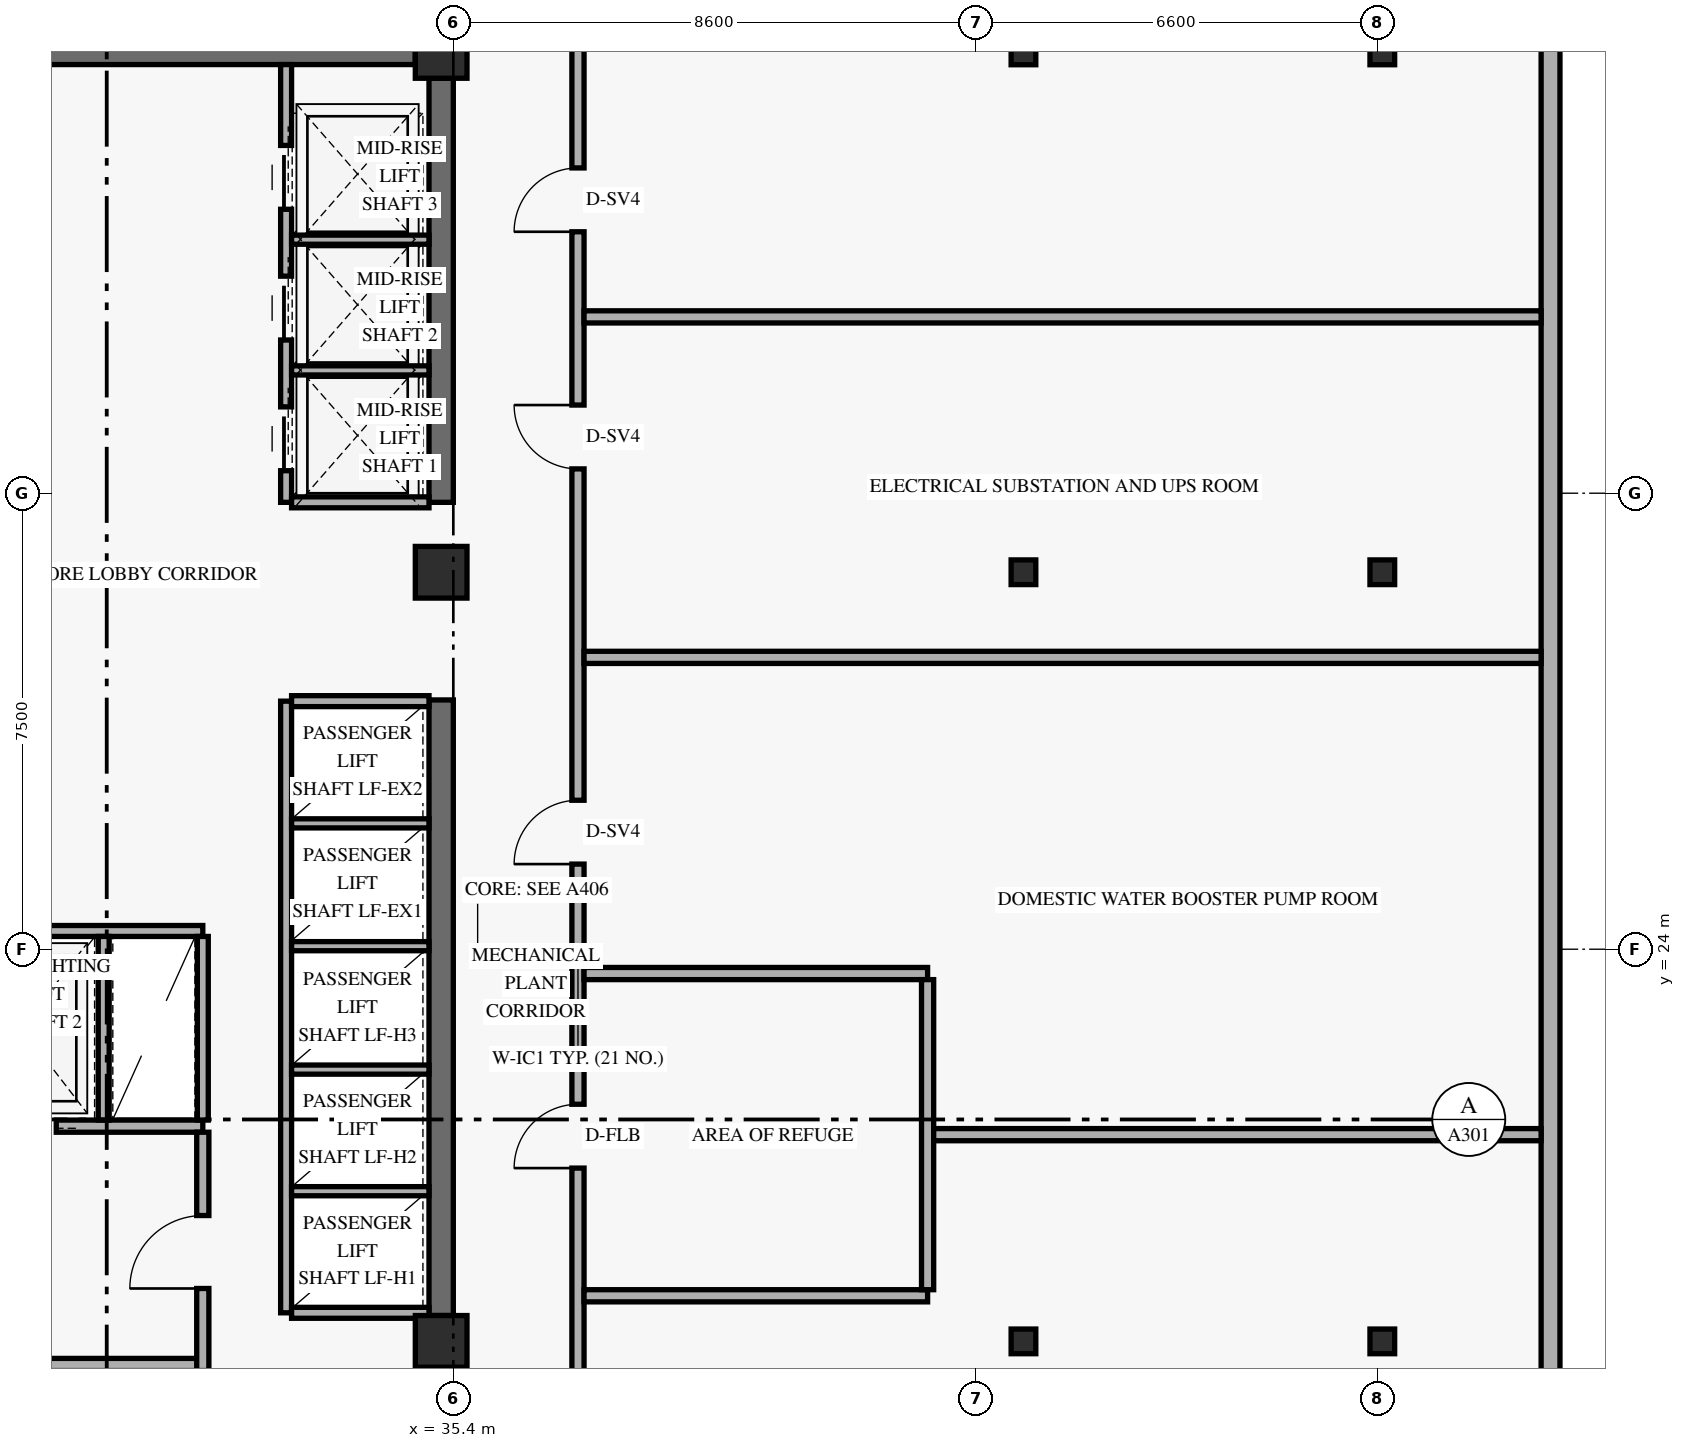
"""IFC4 building model, lengths in metres.
Left out: names, types, materials, properties, quantities, classifications, styles, units other than length and angle.
Written with IfcOpenShell. Run it as: python <this file> out.ifc"""

import sys

from ifc_helpers import new_model, si_unit, direction, frame, frame_2d, origin, origin_2d, place, context, subcontext, project, spatial, rectangle, hollow_rectangle, extrude, element, fill, save


model = new_model("IFC4")
c1 = context("Model", 3, precision=1e-05, world=origin(), true_north=direction((0.0, 1.0)))
c2 = subcontext(c1, "Body", "Model", "MODEL_VIEW")
j1 = project(units=[si_unit("LENGTHUNIT", "METRE"), si_unit("PLANEANGLEUNIT", "RADIAN")], contexts=[c1])
p1 = place(None, origin())
s1 = spatial("IfcSite", under=j1, at=p1, CompositionType="ELEMENT")
p2 = place(p1, origin())
s2 = spatial("IfcBuilding", under=s1, at=p2, CompositionType="ELEMENT")
p3 = place(p2, frame((0.0, 0.0, 135.6)))
s3 = spatial("IfcBuildingStorey", under=s2, at=p3, CompositionType="ELEMENT", Elevation=135.6)
p4 = place(p3, frame((35.2, 17.975, 0.0), z_axis=(0.0, 0.0, 1.0), x_axis=(0.0, 1.0, 0.0)))
e1 = element("IfcWall", 1, at=p4, inside=s3, PredefinedType="SHEAR", context=c2, shape_type="SweptSolid", body=[
    extrude(rectangle(XDim=10.125, YDim=0.4, at=frame_2d((5.062, 0.0))), origin(), (0.0, 0.0, 1.0), 4.549),
])
p5 = place(p3, frame((35.2, 31.35, 0.0), z_axis=(0.0, 0.0, 1.0), x_axis=(0.0, 1.0, 0.0)))
e2 = element("IfcWall", 2, at=p5, inside=s3, PredefinedType="SHEAR", context=c2, shape_type="SweptSolid", body=[
    extrude(rectangle(XDim=6.975, YDim=0.4, at=frame_2d((3.487, 0.0))), origin(), (0.0, 0.0, 1.0), 4.549),
])
p6 = place(p3, frame((24.625, 38.75, 0.0), z_axis=(0.0, 0.0, 1.0), x_axis=(1.0, 0.0, 0.0)))
e3 = element("IfcWall", 3, at=p6, inside=s3, PredefinedType="SHEAR", context=c2, shape_type="SweptSolid", body=[
    extrude(rectangle(XDim=10.15, YDim=0.4, at=frame_2d((5.075, 0.0))), origin(), (0.0, 0.0, 1.0), 5.16),
])
for number, where, z_axis, x_axis in (
    (4, (35.2, 17.55, 0.0), (0.0, 0.0, 1.0), (1.0, 0.0, 0.0)),
    (5, (35.2, 30.2, 0.0), (0.0, 0.0, 1.0), (1.0, 0.0, 0.0)),
    (6, (35.2, 38.75, 0.0), (0.0, 0.0, 1.0), (1.0, 0.0, 0.0)),
):
    element("IfcColumn", number, at=place(p3, frame(where, z_axis=z_axis, x_axis=x_axis)), inside=s3, PredefinedType="COLUMN", context=c2, shape_type="SweptSolid", body=[
        extrude(rectangle(XDim=0.85, YDim=0.85, at=origin_2d()), origin(), (0.0, 0.0, 1.0), 5.4),
    ])
for number, where, z_axis, x_axis in (
    (7, (44.682, 17.55, 0.0), (0.035, 0.0, 0.999), (0.0, 1.0, 0.0)),
    (8, (44.682, 30.2, 0.0), (0.035, 0.0, 0.999), (0.0, 1.0, 0.0)),
    (9, (44.682, 38.75, 0.0), (0.035, 0.0, 0.999), (0.0, 1.0, 0.0)),
):
    element("IfcColumn", number, at=place(p3, frame(where, z_axis=z_axis, x_axis=x_axis)), inside=s3, PredefinedType="COLUMN", context=c2, shape_type="SweptSolid", body=[
        extrude(hollow_rectangle(XDim=0.406, YDim=0.406, WallThickness=0.016, at=origin_2d()), origin(), (0.0, 0.0, 1.0), 5.403),
    ])
for number, where, z_axis, x_axis in (
    (10, (50.521, 17.55, 0.0), (0.058, 0.0, 0.998), (0.0, 1.0, 0.0)),
    (11, (50.521, 30.2, 0.0), (0.058, 0.0, 0.998), (0.0, 1.0, 0.0)),
    (12, (50.521, 38.75, 0.0), (0.058, 0.0, 0.998), (0.0, 1.0, 0.0)),
):
    element("IfcColumn", number, at=place(p3, frame(where, z_axis=z_axis, x_axis=x_axis)), inside=s3, PredefinedType="COLUMN", context=c2, shape_type="SweptSolid", body=[
        extrude(hollow_rectangle(XDim=0.406, YDim=0.406, WallThickness=0.016, at=origin_2d()), origin(), (0.0, 0.0, 1.0), 5.409),
    ])
p7 = place(p3, frame((53.445, 6.32, 0.0), z_axis=(0.0, 0.0, 1.0), x_axis=(0.0, 1.0, 0.0)))
e13 = element("IfcWall", 13, at=p7, inside=s3, PredefinedType="SOLIDWALL", context=c2, shape_type="SweptSolid", body=[
    extrude(rectangle(XDim=35.36, YDim=0.31, at=frame_2d((17.68, 0.0))), origin(), (0.0, 0.0, 1.0), 5.16),
])
p8 = place(p3, frame((24.45, 21.09, 0.0), z_axis=(0.0, 0.0, 1.0), x_axis=(1.0, 0.0, 0.0)))
e14 = element("IfcWall", 14, at=p8, inside=s3, PredefinedType="STANDARD", context=c2, shape_type="SweptSolid", body=[
    extrude(rectangle(XDim=6.83, YDim=0.2, at=frame_2d((3.415, 0.0))), origin(), (0.0, 0.0, 1.0), 5.16),
])
p9 = place(p8, frame((0.72, 0.0, 0.0)))
e15 = element("IfcOpeningElement", 15, at=p9, cuts=e14, PredefinedType="OPENING", context=c2, shape_type="SweptSolid", body=[
    extrude(rectangle(XDim=1.1, YDim=2.2, at=frame_2d((0.55, 1.1))), frame((0.0, 0.11, 0.0), z_axis=(0.0, -1.0, 0.0), x_axis=(1.0, 0.0, 0.0)), (0.0, 0.0, 1.0), 0.22),
])
p10 = place(p8, frame((3.32, 0.0, 0.0)))
e16 = element("IfcOpeningElement", 16, at=p10, cuts=e14, PredefinedType="OPENING", context=c2, shape_type="SweptSolid", body=[
    extrude(rectangle(XDim=1.1, YDim=2.2, at=frame_2d((0.55, 1.1))), frame((0.0, 0.11, 0.0), z_axis=(0.0, -1.0, 0.0), x_axis=(1.0, 0.0, 0.0)), (0.0, 0.0, 1.0), 0.22),
])
p11 = place(p3, frame((28.38, 17.17, 0.0), z_axis=(0.0, 0.0, 1.0), x_axis=(1.0, 0.0, 0.0)))
e17 = element("IfcWall", 17, at=p11, inside=s3, PredefinedType="STANDARD", context=c2, shape_type="SweptSolid", body=[
    extrude(rectangle(XDim=2.9, YDim=0.2, at=frame_2d((1.45, 0.0))), origin(), (0.0, 0.0, 1.0), 5.16),
])
p12 = place(p3, frame((31.28, 17.07, 0.0), z_axis=(0.0, 0.0, 1.0), x_axis=(0.0, 1.0, 0.0)))
e18 = element("IfcWall", 18, at=p12, inside=s3, PredefinedType="STANDARD", context=c2, shape_type="SweptSolid", body=[
    extrude(rectangle(XDim=3.92, YDim=0.2, at=frame_2d((1.96, 0.0))), origin(), (0.0, 0.0, 1.0), 4.531),
])
p13 = place(p12, frame((1.35, 0.0, 0.0)))
e19 = element("IfcOpeningElement", 19, at=p13, cuts=e18, PredefinedType="OPENING", context=c2, shape_type="SweptSolid", body=[
    extrude(rectangle(XDim=1.2, YDim=2.15, at=frame_2d((0.6, 1.075))), frame((0.0, 0.11, 0.0), z_axis=(0.0, -1.0, 0.0), x_axis=(1.0, 0.0, 0.0)), (0.0, 0.0, 1.0), 0.22),
])
p14 = place(p3, frame((24.45, 24.3, 0.0), z_axis=(0.0, 0.0, 1.0), x_axis=(1.0, 0.0, 0.0)))
e20 = element("IfcWall", 20, at=p14, inside=s3, PredefinedType="STANDARD", context=c2, shape_type="SweptSolid", body=[
    extrude(rectangle(XDim=6.83, YDim=0.18, at=frame_2d((3.415, 0.0))), origin(), (0.0, 0.0, 1.0), 5.16),
])
for number, where, z_axis, x_axis in (
    (21, (29.65, 21.19, 0.0), (0.0, 0.0, 1.0), (0.0, 1.0, 0.0)),
    (22, (31.28, 21.19, 0.0), (0.0, 0.0, 1.0), (0.0, 1.0, 0.0)),
):
    element("IfcWall", number, at=place(p3, frame(where, z_axis=z_axis, x_axis=x_axis)), inside=s3, PredefinedType="STANDARD", context=c2, shape_type="SweptSolid", body=[
        extrude(rectangle(XDim=3.02, YDim=0.18, at=frame_2d((1.51, 0.0))), origin(), (0.0, 0.0, 1.0), 5.16),
    ])
p15 = place(p3, frame((32.65, 18.02, 0.0), z_axis=(0.0, 0.0, 1.0), x_axis=(0.0, 1.0, 0.0)))
e23 = element("IfcWall", 23, at=p15, inside=s3, PredefinedType="STANDARD", context=c2, shape_type="SweptSolid", body=[
    extrude(rectangle(XDim=10.06, YDim=0.18, at=frame_2d((5.03, 0.0))), origin(), (0.0, 0.0, 1.0), 5.16),
])
for number, where, z_axis, x_axis in (
    (24, (32.74, 18.02, 0.0), (0.0, 0.0, 1.0), (1.0, 0.0, 0.0)),
    (25, (32.74, 28.08, 0.0), (0.0, 0.0, 1.0), (1.0, 0.0, 0.0)),
):
    element("IfcWall", number, at=place(p3, frame(where, z_axis=z_axis, x_axis=x_axis)), inside=s3, PredefinedType="STANDARD", context=c2, shape_type="SweptSolid", body=[
        extrude(rectangle(XDim=2.26, YDim=0.18, at=frame_2d((1.13, 0.0))), origin(), (0.0, 0.0, 1.0), 5.16),
    ])
for number, where, z_axis, x_axis in (
    (26, (32.74, 20.02, 0.0), (0.0, 0.0, 1.0), (1.0, 0.0, 0.0)),
    (27, (32.74, 22.02, 0.0), (0.0, 0.0, 1.0), (1.0, 0.0, 0.0)),
    (28, (32.74, 24.05, 0.0), (0.0, 0.0, 1.0), (1.0, 0.0, 0.0)),
    (29, (32.74, 26.07, 0.0), (0.0, 0.0, 1.0), (1.0, 0.0, 0.0)),
):
    element("IfcWall", number, at=place(p3, frame(where, z_axis=z_axis, x_axis=x_axis)), inside=s3, PredefinedType="STANDARD", context=c2, shape_type="SweptSolid", body=[
        extrude(rectangle(XDim=2.26, YDim=0.15, at=frame_2d((1.13, 0.0))), origin(), (0.0, 0.0, 1.0), 5.16),
    ])
p16 = place(p3, frame((32.65, 31.35, 0.0), z_axis=(0.0, 0.0, 1.0), x_axis=(0.0, 1.0, 0.0)))
e30 = element("IfcWall", 30, at=p16, inside=s3, PredefinedType="STANDARD", context=c2, shape_type="SweptSolid", body=[
    extrude(rectangle(XDim=7.2, YDim=0.18, at=frame_2d((3.6, 0.0))), origin(), (0.0, 0.0, 1.0), 5.16),
])
p17 = place(p16, frame((0.52, 0.0, 0.0)))
e31 = element("IfcOpeningElement", 31, at=p17, cuts=e30, PredefinedType="OPENING", context=c2, shape_type="SweptSolid", body=[
    extrude(rectangle(XDim=1.05, YDim=2.2, at=frame_2d((0.525, 1.1))), frame((0.0, 0.1, 0.0), z_axis=(0.0, -1.0, 0.0), x_axis=(1.0, 0.0, 0.0)), (0.0, 0.0, 1.0), 0.2),
])
p18 = place(p16, frame((2.67, 0.0, 0.0)))
e32 = element("IfcOpeningElement", 32, at=p18, cuts=e30, PredefinedType="OPENING", context=c2, shape_type="SweptSolid", body=[
    extrude(rectangle(XDim=1.05, YDim=2.2, at=frame_2d((0.525, 1.1))), frame((0.0, 0.1, 0.0), z_axis=(0.0, -1.0, 0.0), x_axis=(1.0, 0.0, 0.0)), (0.0, 0.0, 1.0), 0.2),
])
p19 = place(p16, frame((4.82, 0.0, 0.0)))
e33 = element("IfcOpeningElement", 33, at=p19, cuts=e30, PredefinedType="OPENING", context=c2, shape_type="SweptSolid", body=[
    extrude(rectangle(XDim=1.05, YDim=2.2, at=frame_2d((0.525, 1.1))), frame((0.0, 0.1, 0.0), z_axis=(0.0, -1.0, 0.0), x_axis=(1.0, 0.0, 0.0)), (0.0, 0.0, 1.0), 0.2),
])
p20 = place(p3, frame((32.74, 31.35, 0.0), z_axis=(0.0, 0.0, 1.0), x_axis=(1.0, 0.0, 0.0)))
e34 = element("IfcWall", 34, at=p20, inside=s3, PredefinedType="STANDARD", context=c2, shape_type="SweptSolid", body=[
    extrude(rectangle(XDim=2.26, YDim=0.18, at=frame_2d((1.13, 0.0))), origin(), (0.0, 0.0, 1.0), 5.16),
])
for number, where, z_axis, x_axis in (
    (35, (32.74, 33.52, 0.0), (0.0, 0.0, 1.0), (1.0, 0.0, 0.0)),
    (36, (32.74, 35.67, 0.0), (0.0, 0.0, 1.0), (1.0, 0.0, 0.0)),
):
    element("IfcWall", number, at=place(p3, frame(where, z_axis=z_axis, x_axis=x_axis)), inside=s3, PredefinedType="STANDARD", context=c2, shape_type="SweptSolid", body=[
        extrude(rectangle(XDim=2.26, YDim=0.15, at=frame_2d((1.13, 0.0))), origin(), (0.0, 0.0, 1.0), 5.16),
    ])
p21 = place(p3, frame((37.45, 8.65, 0.0), z_axis=(0.0, 0.0, 1.0), x_axis=(0.0, 1.0, 0.0)))
e37 = element("IfcWall", 37, at=p21, inside=s3, PredefinedType="STANDARD", context=c2, shape_type="SweptSolid", body=[
    extrude(rectangle(XDim=30.7, YDim=0.2, at=frame_2d((15.35, 0.0))), origin(), (0.0, 0.0, 1.0), 4.531),
])
p22 = place(p21, frame((11.75, 0.0, 0.0)))
e38 = element("IfcOpeningElement", 38, at=p22, cuts=e37, PredefinedType="OPENING", context=c2, shape_type="SweptSolid", body=[
    extrude(rectangle(XDim=1.05, YDim=2.15, at=frame_2d((0.525, 1.075))), frame((0.0, 0.11, 0.0), z_axis=(0.0, -1.0, 0.0), x_axis=(1.0, 0.0, 0.0)), (0.0, 0.0, 1.0), 0.22),
])
p23 = place(p21, frame((5.75, 0.0, 0.0)))
e39 = element("IfcOpeningElement", 39, at=p23, cuts=e37, PredefinedType="OPENING", context=c2, shape_type="SweptSolid", body=[
    extrude(rectangle(XDim=1.0, YDim=2.15, at=frame_2d((0.5, 1.075))), frame((0.0, 0.11, 0.0), z_axis=(0.0, -1.0, 0.0), x_axis=(1.0, 0.0, 0.0)), (0.0, 0.0, 1.0), 0.22),
])
p24 = place(p21, frame((16.75, 0.0, 0.0)))
e40 = element("IfcOpeningElement", 40, at=p24, cuts=e37, PredefinedType="OPENING", context=c2, shape_type="SweptSolid", body=[
    extrude(rectangle(XDim=1.05, YDim=2.15, at=frame_2d((0.525, 1.075))), frame((0.0, 0.11, 0.0), z_axis=(0.0, -1.0, 0.0), x_axis=(1.0, 0.0, 0.0)), (0.0, 0.0, 1.0), 0.22),
])
p25 = place(p21, frame((23.25, 0.0, 0.0)))
e41 = element("IfcOpeningElement", 41, at=p25, cuts=e37, PredefinedType="OPENING", context=c2, shape_type="SweptSolid", body=[
    extrude(rectangle(XDim=1.05, YDim=2.15, at=frame_2d((0.525, 1.075))), frame((0.0, 0.11, 0.0), z_axis=(0.0, -1.0, 0.0), x_axis=(1.0, 0.0, 0.0)), (0.0, 0.0, 1.0), 0.22),
])
p26 = place(p21, frame((27.15, 0.0, 0.0)))
e42 = element("IfcOpeningElement", 42, at=p26, cuts=e37, PredefinedType="OPENING", context=c2, shape_type="SweptSolid", body=[
    extrude(rectangle(XDim=1.05, YDim=2.15, at=frame_2d((0.525, 1.075))), frame((0.0, 0.11, 0.0), z_axis=(0.0, -1.0, 0.0), x_axis=(1.0, 0.0, 0.0)), (0.0, 0.0, 1.0), 0.22),
])
for number, where, z_axis, x_axis in (
    (43, (37.55, 18.3, 0.0), (0.0, 0.0, 1.0), (1.0, 0.0, 0.0)),
    (44, (37.55, 23.6, 0.0), (0.0, 0.0, 1.0), (1.0, 0.0, 0.0)),
):
    element("IfcWall", number, at=place(p3, frame(where, z_axis=z_axis, x_axis=x_axis)), inside=s3, PredefinedType="STANDARD", context=c2, shape_type="SweptSolid", body=[
        extrude(rectangle(XDim=5.65, YDim=0.2, at=frame_2d((2.825, 0.0))), origin(), (0.0, 0.0, 1.0), 5.16),
    ])
p27 = place(p3, frame((43.2, 18.4, 0.0), z_axis=(0.0, 0.0, 1.0), x_axis=(0.0, 1.0, 0.0)))
e45 = element("IfcWall", 45, at=p27, inside=s3, PredefinedType="STANDARD", context=c2, shape_type="SweptSolid", body=[
    extrude(rectangle(XDim=5.1, YDim=0.2, at=frame_2d((2.55, 0.0))), origin(), (0.0, 0.0, 1.0), 5.16),
])
p28 = place(p3, frame((43.3, 20.95, 0.0), z_axis=(0.0, 0.0, 1.0), x_axis=(1.0, 0.0, 0.0)))
e46 = element("IfcWall", 46, at=p28, inside=s3, PredefinedType="STANDARD", context=c2, shape_type="SweptSolid", body=[
    extrude(rectangle(XDim=9.99, YDim=0.2, at=frame_2d((4.995, 0.0))), origin(), (0.0, 0.0, 1.0), 4.531),
])
for number, where, z_axis, x_axis in (
    (47, (37.55, 28.8, 0.0), (0.0, 0.0, 1.0), (1.0, 0.0, 0.0)),
    (48, (37.55, 34.4, 0.0), (0.0, 0.0, 1.0), (1.0, 0.0, 0.0)),
):
    element("IfcWall", number, at=place(p3, frame(where, z_axis=z_axis, x_axis=x_axis)), inside=s3, PredefinedType="STANDARD", context=c2, shape_type="SweptSolid", body=[
        extrude(rectangle(XDim=15.74, YDim=0.2, at=frame_2d((7.87, 0.0))), origin(), (0.0, 0.0, 1.0), 4.531),
    ])
p29 = place(p10, origin())
e49 = element("IfcDoor", 49, at=p29, inside=s3, OperationType="SLIDING_TO_LEFT", PredefinedType="DOOR", context=c2, shape_type="SweptSolid", body=[
    extrude(rectangle(XDim=1.1, YDim=2.2, at=frame_2d((0.55, 1.1))), frame((0.0, 0.025, 0.0), z_axis=(0.0, -1.0, 0.0), x_axis=(1.0, 0.0, 0.0)), (0.0, 0.0, 1.0), 0.05),
])
fill(e16, e49)
p30 = place(p13, origin())
e50 = element("IfcDoor", 50, at=p30, inside=s3, OperationType="SINGLE_SWING_LEFT", PredefinedType="DOOR", context=c2, shape_type="SweptSolid", body=[
    extrude(rectangle(XDim=1.2, YDim=2.15, at=frame_2d((0.6, 1.075))), frame((0.0, 0.025, 0.0), z_axis=(0.0, -1.0, 0.0), x_axis=(1.0, 0.0, 0.0)), (0.0, 0.0, 1.0), 0.05),
])
fill(e19, e50)
p31 = place(p17, origin())
e51 = element("IfcDoor", 51, at=p31, inside=s3, OperationType="SLIDING_TO_LEFT", PredefinedType="DOOR", context=c2, shape_type="SweptSolid", body=[
    extrude(rectangle(XDim=1.05, YDim=2.2, at=frame_2d((0.525, 1.1))), frame((0.0, 0.025, 0.0), z_axis=(0.0, -1.0, 0.0), x_axis=(1.0, 0.0, 0.0)), (0.0, 0.0, 1.0), 0.05),
])
fill(e31, e51)
p32 = place(p18, origin())
e52 = element("IfcDoor", 52, at=p32, inside=s3, OperationType="SLIDING_TO_LEFT", PredefinedType="DOOR", context=c2, shape_type="SweptSolid", body=[
    extrude(rectangle(XDim=1.05, YDim=2.2, at=frame_2d((0.525, 1.1))), frame((0.0, 0.025, 0.0), z_axis=(0.0, -1.0, 0.0), x_axis=(1.0, 0.0, 0.0)), (0.0, 0.0, 1.0), 0.05),
])
fill(e32, e52)
p33 = place(p19, origin())
e53 = element("IfcDoor", 53, at=p33, inside=s3, OperationType="SLIDING_TO_LEFT", PredefinedType="DOOR", context=c2, shape_type="SweptSolid", body=[
    extrude(rectangle(XDim=1.05, YDim=2.2, at=frame_2d((0.525, 1.1))), frame((0.0, 0.025, 0.0), z_axis=(0.0, -1.0, 0.0), x_axis=(1.0, 0.0, 0.0)), (0.0, 0.0, 1.0), 0.05),
])
fill(e33, e53)
p34 = place(p22, origin())
e54 = element("IfcDoor", 54, at=p34, inside=s3, OperationType="SINGLE_SWING_LEFT", PredefinedType="DOOR", context=c2, shape_type="SweptSolid", body=[
    extrude(rectangle(XDim=1.05, YDim=2.15, at=frame_2d((0.525, 1.075))), frame((0.0, 0.025, 0.0), z_axis=(0.0, -1.0, 0.0), x_axis=(1.0, 0.0, 0.0)), (0.0, 0.0, 1.0), 0.05),
])
fill(e38, e54)
p35 = place(p24, origin())
e55 = element("IfcDoor", 55, at=p35, inside=s3, OperationType="SINGLE_SWING_LEFT", PredefinedType="DOOR", context=c2, shape_type="SweptSolid", body=[
    extrude(rectangle(XDim=1.05, YDim=2.15, at=frame_2d((0.525, 1.075))), frame((0.0, 0.025, 0.0), z_axis=(0.0, -1.0, 0.0), x_axis=(1.0, 0.0, 0.0)), (0.0, 0.0, 1.0), 0.05),
])
fill(e40, e55)
p36 = place(p25, origin())
e56 = element("IfcDoor", 56, at=p36, inside=s3, OperationType="SINGLE_SWING_RIGHT", PredefinedType="DOOR", context=c2, shape_type="SweptSolid", body=[
    extrude(rectangle(XDim=1.05, YDim=2.15, at=frame_2d((0.525, 1.075))), frame((0.0, 0.025, 0.0), z_axis=(0.0, -1.0, 0.0), x_axis=(1.0, 0.0, 0.0)), (0.0, 0.0, 1.0), 0.05),
])
fill(e41, e56)
p37 = place(p26, origin())
e57 = element("IfcDoor", 57, at=p37, inside=s3, OperationType="SINGLE_SWING_LEFT", PredefinedType="DOOR", context=c2, shape_type="SweptSolid", body=[
    extrude(rectangle(XDim=1.05, YDim=2.15, at=frame_2d((0.525, 1.075))), frame((0.0, 0.025, 0.0), z_axis=(0.0, -1.0, 0.0), x_axis=(1.0, 0.0, 0.0)), (0.0, 0.0, 1.0), 0.05),
])
fill(e42, e57)
save(model, sys.argv[1])
